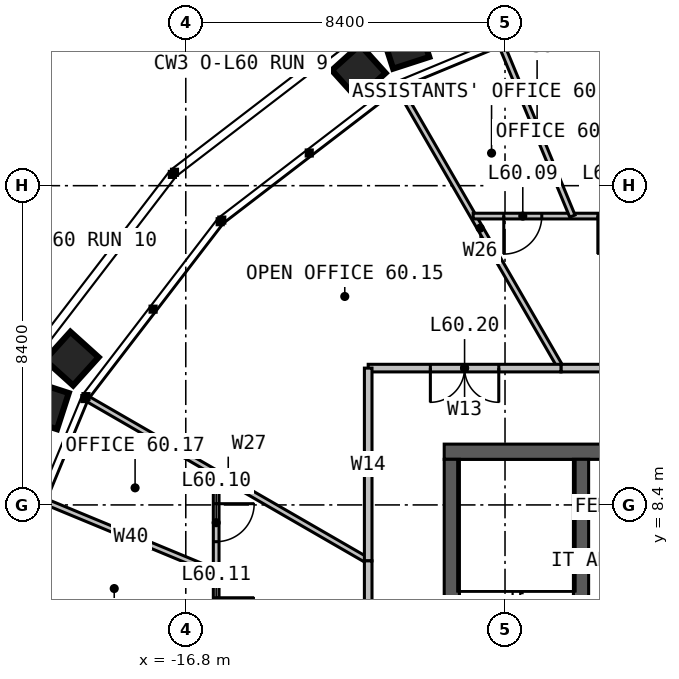
"""IFC4 building model, lengths in metres.
Left out: names, types, materials, properties, quantities, classifications, styles, units other than length and angle.
Written with IfcOpenShell. Run it as: python <this file> out.ifc"""

import sys

from ifc_helpers import new_model, si_unit, direction, frame, frame_2d, origin, place, context, subcontext, project, spatial, rectangle, extrude, element, fill, save


model = new_model("IFC4")
c1 = context("Model", 3, precision=1e-05, world=origin(), true_north=direction((0.0, 1.0)))
c2 = subcontext(c1, "Body", "Model", "MODEL_VIEW")
j1 = project(units=[si_unit("LENGTHUNIT", "METRE"), si_unit("PLANEANGLEUNIT", "RADIAN")], contexts=[c1])
p1 = place(None, origin())
s1 = spatial("IfcSite", under=j1, at=p1, CompositionType="ELEMENT")
p2 = place(p1, origin())
s2 = spatial("IfcBuilding", under=s1, at=p2, CompositionType="ELEMENT")
p3 = place(p2, frame((0.0, 0.0, 248.0)))
s3 = spatial("IfcBuildingStorey", under=s2, at=p3, CompositionType="ELEMENT", Elevation=248.0)
p4 = place(p3, frame((-10.0, 9.8, 0.0), z_axis=(0.0, 0.0, 1.0), x_axis=(1.0, 0.0, 0.0)))
e1 = element("IfcWall", 1, at=p4, inside=s3, PredefinedType="SOLIDWALL", context=c2, shape_type="SweptSolid", body=[
    extrude(rectangle(XDim=20.0, YDim=0.4, at=frame_2d((10.0, 0.0))), origin(), (0.0, 0.0, 1.0), 4.0),
])
p5 = place(p4, frame((9.4, 0.0, 0.0)))
e2 = element("IfcOpeningElement", 2, at=p5, cuts=e1, PredefinedType="OPENING", context=c2, shape_type="SweptSolid", body=[
    extrude(rectangle(XDim=1.2, YDim=2.2, at=frame_2d((0.6, 1.1))), frame((0.0, 0.21, 0.0), z_axis=(0.0, -1.0, 0.0), x_axis=(1.0, 0.0, 0.0)), (0.0, 0.0, 1.0), 0.42),
])
p6 = place(p3, frame((-9.8, 9.6, 0.0), z_axis=(0.0, 0.0, 1.0), x_axis=(0.0, -1.0, 0.0)))
e3 = element("IfcWall", 3, at=p6, inside=s3, PredefinedType="SOLIDWALL", context=c2, shape_type="SweptSolid", body=[
    extrude(rectangle(XDim=19.2, YDim=0.4, at=frame_2d((9.6, 0.0))), origin(), (0.0, 0.0, 1.0), 4.0),
])
p7 = place(p3, frame((-6.4, -9.6, 0.0), z_axis=(0.0, 0.0, 1.0), x_axis=(0.0, 1.0, 0.0)))
e4 = element("IfcWall", 4, at=p7, inside=s3, PredefinedType="SOLIDWALL", context=c2, shape_type="SweptSolid", body=[
    extrude(rectangle(XDim=19.2, YDim=0.4, at=frame_2d((9.6, 0.0))), origin(), (0.0, 0.0, 1.0), 4.0),
])
p8 = place(p7, frame((9.1, 0.0, 0.0)))
e5 = element("IfcOpeningElement", 5, at=p8, cuts=e4, PredefinedType="OPENING", context=c2, shape_type="SweptSolid", body=[
    extrude(rectangle(XDim=1.0, YDim=2.2, at=frame_2d((0.5, 1.1))), frame((0.0, 0.21, 0.0), z_axis=(0.0, -1.0, 0.0), x_axis=(1.0, 0.0, 0.0)), (0.0, 0.0, 1.0), 0.42),
])
p9 = place(p3, frame((-6.2, 7.0, 0.0), z_axis=(0.0, 0.0, 1.0), x_axis=(1.0, 0.0, 0.0)))
e6 = element("IfcWall", 6, at=p9, inside=s3, PredefinedType="PARTITIONING", context=c2, shape_type="SweptSolid", body=[
    extrude(rectangle(XDim=3.225, YDim=0.15, at=frame_2d((1.612, 0.0))), origin(), (0.0, 0.0, 1.0), 3.75),
])
for number, where, z_axis, x_axis in (
    (7, (-6.928, 12.0, 0.0), (0.0, 0.0, 1.0), (-0.5, 0.866, 0.0)),
    (8, (-12.0, 6.928, 0.0), (0.0, 0.0, 1.0), (-0.866, 0.5, 0.0)),
):
    element("IfcWall", number, at=place(p3, frame(where, z_axis=z_axis, x_axis=x_axis)), inside=s3, PredefinedType="PARTITIONING", context=c2, shape_type="SweptSolid", body=[
        extrude(rectangle(XDim=8.505, YDim=0.15, at=frame_2d((4.252, 0.0))), origin(), (0.0, 0.0, 1.0), 2.79),
    ])
p10 = place(p3, frame((9.238, 16.0, 0.0), z_axis=(0.0, 0.0, 1.0), x_axis=(-1.0, 0.0, 0.0)))
e9 = element("IfcWall", 9, at=p10, inside=s3, PredefinedType="PARTITIONING", context=c2, shape_type="SweptSolid", body=[
    extrude(rectangle(XDim=18.475, YDim=0.15, at=frame_2d((9.238, 0.0))), origin(), (0.0, 0.0, 1.0), 2.79),
])
p11 = place(p10, frame((1.975, 0.0, 0.0)))
e10 = element("IfcOpeningElement", 10, at=p11, cuts=e9, PredefinedType="OPENING", context=c2, shape_type="SweptSolid", body=[
    extrude(rectangle(XDim=1.0, YDim=2.2, at=frame_2d((0.5, 1.1))), frame((0.0, 0.085, 0.0), z_axis=(0.0, -1.0, 0.0), x_axis=(1.0, 0.0, 0.0)), (0.0, 0.0, 1.0), 0.17),
])
p12 = place(p10, frame((6.594, 0.0, 0.0)))
e11 = element("IfcOpeningElement", 11, at=p12, cuts=e9, PredefinedType="OPENING", context=c2, shape_type="SweptSolid", body=[
    extrude(rectangle(XDim=1.0, YDim=2.2, at=frame_2d((0.5, 1.1))), frame((0.0, 0.085, 0.0), z_axis=(0.0, -1.0, 0.0), x_axis=(1.0, 0.0, 0.0)), (0.0, 0.0, 1.0), 0.17),
])
p13 = place(p10, frame((10.881, 0.0, 0.0)))
e12 = element("IfcOpeningElement", 12, at=p13, cuts=e9, PredefinedType="OPENING", context=c2, shape_type="SweptSolid", body=[
    extrude(rectangle(XDim=1.0, YDim=2.2, at=frame_2d((0.5, 1.1))), frame((0.0, 0.085, 0.0), z_axis=(0.0, -1.0, 0.0), x_axis=(1.0, 0.0, 0.0)), (0.0, 0.0, 1.0), 0.17),
])
p14 = place(p10, frame((14.195, 0.0, 0.0)))
e13 = element("IfcOpeningElement", 13, at=p14, cuts=e9, PredefinedType="OPENING", context=c2, shape_type="SweptSolid", body=[
    extrude(rectangle(XDim=1.0, YDim=2.2, at=frame_2d((0.5, 1.1))), frame((0.0, 0.085, 0.0), z_axis=(0.0, -1.0, 0.0), x_axis=(1.0, 0.0, 0.0)), (0.0, 0.0, 1.0), 0.17),
])
p15 = place(p10, frame((16.67, 0.0, 0.0)))
e14 = element("IfcOpeningElement", 14, at=p15, cuts=e9, PredefinedType="OPENING", context=c2, shape_type="SweptSolid", body=[
    extrude(rectangle(XDim=1.0, YDim=2.2, at=frame_2d((0.5, 1.1))), frame((0.0, 0.085, 0.0), z_axis=(0.0, -1.0, 0.0), x_axis=(1.0, 0.0, 0.0)), (0.0, 0.0, 1.0), 0.17),
])
p16 = place(p3, frame((-6.627, 16.0, 0.0), z_axis=(0.0, 0.0, 1.0), x_axis=(-0.38268510723, 0.923878838758, 0.0)))
e15 = element("IfcWall", 15, at=p16, inside=s3, PredefinedType="PARTITIONING", context=c2, shape_type="SweptSolid", body=[
    extrude(rectangle(XDim=4.852, YDim=0.15, at=frame_2d((2.426, 0.0))), origin(), (0.0, 0.0, 1.0), 2.79),
])
p17 = place(p3, frame((6.928, 12.0, 0.0), z_axis=(0.0, 0.0, 1.0), x_axis=(-1.0, 0.0, 0.0)))
e16 = element("IfcWall", 16, at=p17, inside=s3, PredefinedType="PARTITIONING", context=c2, shape_type="SweptSolid", body=[
    extrude(rectangle(XDim=13.856, YDim=0.2, at=frame_2d((6.928, 0.0))), origin(), (0.0, 0.0, 1.0), 3.8),
])
p18 = place(p17, frame((6.028, 0.0, 0.0)))
e17 = element("IfcOpeningElement", 17, at=p18, cuts=e16, PredefinedType="OPENING", context=c2, shape_type="SweptSolid", body=[
    extrude(rectangle(XDim=1.8, YDim=2.2, at=frame_2d((0.9, 1.1))), frame((0.0, 0.11, 0.0), z_axis=(0.0, -1.0, 0.0), x_axis=(1.0, 0.0, 0.0)), (0.0, 0.0, 1.0), 0.22),
])
p19 = place(p3, frame((-6.928, 12.0, 0.0), z_axis=(0.0, 0.0, 1.0), x_axis=(-1.0, 0.0, 0.0)))
e18 = element("IfcWall", 18, at=p19, inside=s3, PredefinedType="PARTITIONING", context=c2, shape_type="SweptSolid", body=[
    extrude(rectangle(XDim=5.072, YDim=0.2, at=frame_2d((2.536, 0.0))), origin(), (0.0, 0.0, 1.0), 3.8),
])
p20 = place(p19, frame((1.636, 0.0, 0.0)))
e19 = element("IfcOpeningElement", 19, at=p20, cuts=e18, PredefinedType="OPENING", context=c2, shape_type="SweptSolid", body=[
    extrude(rectangle(XDim=1.8, YDim=2.2, at=frame_2d((0.9, 1.1))), frame((0.0, 0.11, 0.0), z_axis=(0.0, -1.0, 0.0), x_axis=(1.0, 0.0, 0.0)), (0.0, 0.0, 1.0), 0.22),
])
p21 = place(p3, frame((-12.0, 12.0, 0.0), z_axis=(0.0, 0.0, 1.0), x_axis=(0.0, -1.0, 0.0)))
e20 = element("IfcWall", 20, at=p21, inside=s3, PredefinedType="PARTITIONING", context=c2, shape_type="SweptSolid", body=[
    extrude(rectangle(XDim=5.072, YDim=0.2, at=frame_2d((2.536, 0.0))), origin(), (0.0, 0.0, 1.0), 3.8),
])
p22 = place(p3, frame((-16.0, 9.238, 0.0), z_axis=(0.0, 0.0, 1.0), x_axis=(0.0, -1.0, 0.0)))
e21 = element("IfcWall", 21, at=p22, inside=s3, PredefinedType="PARTITIONING", context=c2, shape_type="SweptSolid", body=[
    extrude(rectangle(XDim=18.475, YDim=0.15, at=frame_2d((9.238, 0.0))), origin(), (0.0, 0.0, 1.0), 2.79),
])
p23 = place(p22, frame((0.805, 0.0, 0.0)))
e22 = element("IfcOpeningElement", 22, at=p23, cuts=e21, PredefinedType="OPENING", context=c2, shape_type="SweptSolid", body=[
    extrude(rectangle(XDim=1.0, YDim=2.2, at=frame_2d((0.5, 1.1))), frame((0.0, 0.085, 0.0), z_axis=(0.0, -1.0, 0.0), x_axis=(1.0, 0.0, 0.0)), (0.0, 0.0, 1.0), 0.17),
])
p24 = place(p22, frame((3.28, 0.0, 0.0)))
e23 = element("IfcOpeningElement", 23, at=p24, cuts=e21, PredefinedType="OPENING", context=c2, shape_type="SweptSolid", body=[
    extrude(rectangle(XDim=1.0, YDim=2.2, at=frame_2d((0.5, 1.1))), frame((0.0, 0.085, 0.0), z_axis=(0.0, -1.0, 0.0), x_axis=(1.0, 0.0, 0.0)), (0.0, 0.0, 1.0), 0.17),
])
p25 = place(p22, frame((6.594, 0.0, 0.0)))
e24 = element("IfcOpeningElement", 24, at=p25, cuts=e21, PredefinedType="OPENING", context=c2, shape_type="SweptSolid", body=[
    extrude(rectangle(XDim=1.0, YDim=2.2, at=frame_2d((0.5, 1.1))), frame((0.0, 0.085, 0.0), z_axis=(0.0, -1.0, 0.0), x_axis=(1.0, 0.0, 0.0)), (0.0, 0.0, 1.0), 0.17),
])
p26 = place(p22, frame((12.956, 0.0, 0.0)))
e25 = element("IfcOpeningElement", 25, at=p26, cuts=e21, PredefinedType="OPENING", context=c2, shape_type="SweptSolid", body=[
    extrude(rectangle(XDim=1.8, YDim=2.2, at=frame_2d((0.9, 1.1))), frame((0.0, 0.085, 0.0), z_axis=(0.0, -1.0, 0.0), x_axis=(1.0, 0.0, 0.0)), (0.0, 0.0, 1.0), 0.17),
])
p27 = place(p3, frame((-16.0, 6.627, 0.0), z_axis=(0.0, 0.0, 1.0), x_axis=(-0.923878838758, 0.38268510723, 0.0)))
e26 = element("IfcWall", 26, at=p27, inside=s3, PredefinedType="PARTITIONING", context=c2, shape_type="SweptSolid", body=[
    extrude(rectangle(XDim=4.852, YDim=0.15, at=frame_2d((2.426, 0.0))), origin(), (0.0, 0.0, 1.0), 2.79),
])
p28 = place(p3, frame((-12.0, 6.928, 0.0), z_axis=(0.0, 0.0, 1.0), x_axis=(0.0, -1.0, 0.0)))
e27 = element("IfcWall", 27, at=p28, inside=s3, PredefinedType="PARTITIONING", context=c2, shape_type="SweptSolid", body=[
    extrude(rectangle(XDim=13.856, YDim=0.2, at=frame_2d((6.928, 0.0))), origin(), (0.0, 0.0, 1.0), 3.8),
])
p29 = place(p28, frame((6.028, 0.0, 0.0)))
e28 = element("IfcOpeningElement", 28, at=p29, cuts=e27, PredefinedType="OPENING", context=c2, shape_type="SweptSolid", body=[
    extrude(rectangle(XDim=1.8, YDim=2.2, at=frame_2d((0.9, 1.1))), frame((0.0, 0.11, 0.0), z_axis=(0.0, -1.0, 0.0), x_axis=(1.0, 0.0, 0.0)), (0.0, 0.0, 1.0), 0.22),
])
p30 = place(p14, origin())
e29 = element("IfcDoor", 29, at=p30, inside=s3, OperationType="SINGLE_SWING_RIGHT", PredefinedType="DOOR", context=c2, shape_type="SweptSolid", body=[
    extrude(rectangle(XDim=1.0, YDim=2.2, at=frame_2d((0.5, 1.1))), frame((0.0, 0.025, 0.0), z_axis=(0.0, -1.0, 0.0), x_axis=(1.0, 0.0, 0.0)), (0.0, 0.0, 1.0), 0.05),
])
fill(e13, e29)
p31 = place(p15, origin())
e30 = element("IfcDoor", 30, at=p31, inside=s3, OperationType="SINGLE_SWING_RIGHT", PredefinedType="DOOR", context=c2, shape_type="SweptSolid", body=[
    extrude(rectangle(XDim=1.0, YDim=2.2, at=frame_2d((0.5, 1.1))), frame((0.0, 0.025, 0.0), z_axis=(0.0, -1.0, 0.0), x_axis=(1.0, 0.0, 0.0)), (0.0, 0.0, 1.0), 0.05),
])
fill(e14, e30)
p32 = place(p20, origin())
e31 = element("IfcDoor", 31, at=p32, inside=s3, OperationType="DOUBLE_DOOR_SINGLE_SWING", PredefinedType="DOOR", context=c2, shape_type="SweptSolid", body=[
    extrude(rectangle(XDim=1.8, YDim=2.2, at=frame_2d((0.9, 1.1))), frame((0.0, 0.025, 0.0), z_axis=(0.0, -1.0, 0.0), x_axis=(1.0, 0.0, 0.0)), (0.0, 0.0, 1.0), 0.05),
])
fill(e19, e31)
p33 = place(p23, origin())
e32 = element("IfcDoor", 32, at=p33, inside=s3, OperationType="SINGLE_SWING_LEFT", PredefinedType="DOOR", context=c2, shape_type="SweptSolid", body=[
    extrude(rectangle(XDim=1.0, YDim=2.2, at=frame_2d((0.5, 1.1))), frame((0.0, 0.025, 0.0), z_axis=(0.0, -1.0, 0.0), x_axis=(1.0, 0.0, 0.0)), (0.0, 0.0, 1.0), 0.05),
])
fill(e22, e32)
p34 = place(p24, origin())
e33 = element("IfcDoor", 33, at=p34, inside=s3, OperationType="SINGLE_SWING_LEFT", PredefinedType="DOOR", context=c2, shape_type="SweptSolid", body=[
    extrude(rectangle(XDim=1.0, YDim=2.2, at=frame_2d((0.5, 1.1))), frame((0.0, 0.025, 0.0), z_axis=(0.0, -1.0, 0.0), x_axis=(1.0, 0.0, 0.0)), (0.0, 0.0, 1.0), 0.05),
])
fill(e23, e33)
save(model, sys.argv[1])
